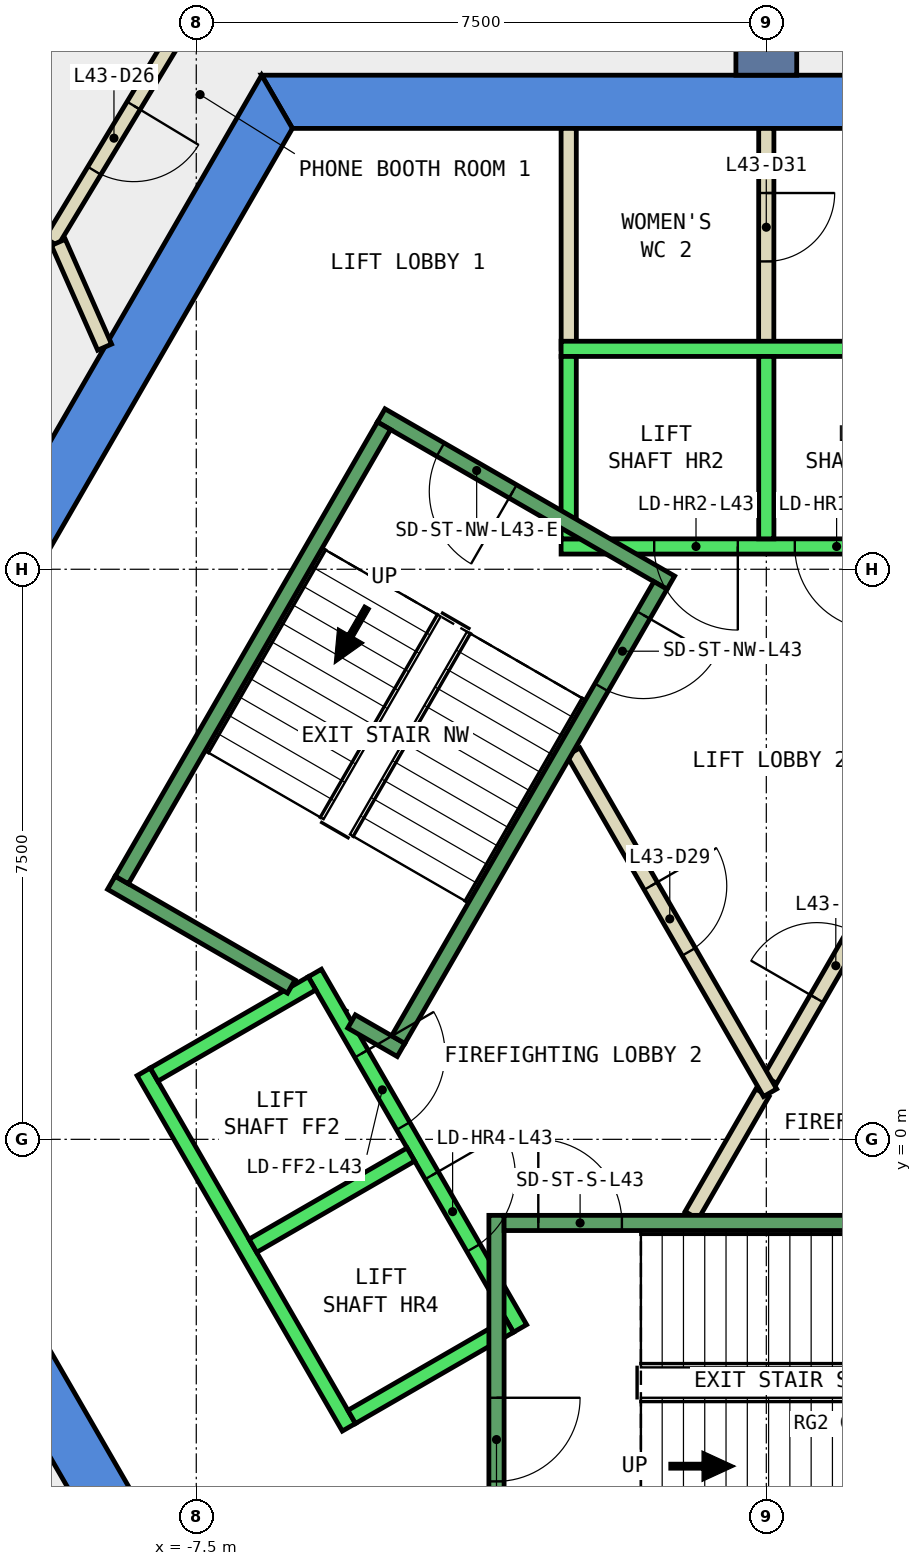
"""IFC4 building model, lengths in metres.
Left out: names, types, materials, properties, quantities, classifications, styles, units other than length and angle.
Written with IfcOpenShell. Run it as: python <this file> out.ifc"""

import sys

from ifc_helpers import new_model, si_unit, direction, frame, frame_2d, origin, place, context, subcontext, project, spatial, polyline, rectangle, outline, extrude, element, fill, save


model = new_model("IFC4")
c1 = context("Model", 3, precision=1e-05, world=origin(), true_north=direction((0.0, 1.0)))
c2 = subcontext(c1, "Body", "Model", "MODEL_VIEW")
j1 = project(units=[si_unit("LENGTHUNIT", "METRE"), si_unit("PLANEANGLEUNIT", "RADIAN")], contexts=[c1])
p1 = place(None, origin())
s1 = spatial("IfcSite", under=j1, at=p1, CompositionType="ELEMENT")
p2 = place(p1, origin())
s2 = spatial("IfcBuilding", under=s1, at=p2, CompositionType="ELEMENT")
p3 = place(p2, frame((0.0, 0.0, 194.0)))
s3 = spatial("IfcBuildingStorey", under=s2, at=p3, CompositionType="ELEMENT", Elevation=194.0)
p4 = place(p3, frame((0.0, 0.0, -0.4)))
e1 = element("IfcWall", 1, at=p4, inside=s3, PredefinedType="SHEAR", context=c2, shape_type="SweptSolid", body=[
    extrude(outline(polyline([(6.64, 14.0), (-6.64, 14.0), (-6.235, 13.3), (6.235, 13.3), (6.64, 14.0)])), origin(), (0.0, 0.0, 1.0), 4.2),
])
p5 = place(p3, frame((0.0, 0.0, -0.4)))
e2 = element("IfcWall", 2, at=p5, inside=s3, PredefinedType="SHEAR", context=c2, shape_type="SweptSolid", body=[
    extrude(outline(polyline([(-11.834, 5.002), (-11.228, 4.652), (-6.235, 13.3), (-6.64, 14.0), (-11.834, 5.002)])), origin(), (0.0, 0.0, 1.0), 4.2),
])
p6 = place(p3, frame((0.0, 0.0, -0.4)))
e3 = element("IfcWall", 3, at=p6, inside=s3, PredefinedType="SHEAR", context=c2, shape_type="SweptSolid", body=[
    extrude(outline(polyline([(-13.279, 2.5), (-6.64, -9.0), (-6.235, -8.3), (-12.471, 2.5), (-13.279, 2.5)])), origin(), (0.0, 0.0, 1.0), 4.2),
])
p7 = place(p3, frame((0.0, 14.0, -0.4), z_axis=(0.0, 0.0, 1.0), x_axis=(0.0, 1.0, 0.0)))
e4 = element("IfcWall", 4, at=p7, inside=s3, PredefinedType="SHEAR", context=c2, shape_type="SweptSolid", body=[
    extrude(rectangle(XDim=9.0, YDim=0.8, at=frame_2d((4.5, 0.0))), origin(), (0.0, 0.0, 1.0), 4.2),
])
p8 = place(p3, frame((-7.759, 14.536, 0.0), z_axis=(0.0, 0.0, 1.0), x_axis=(-0.516926279395, -0.856029918678, 0.0)))
e5 = element("IfcWall", 5, at=p8, inside=s3, PredefinedType="PARTITIONING", context=c2, shape_type="SweptSolid", body=[
    extrude(rectangle(XDim=3.188, YDim=0.2, at=frame_2d((1.594, 0.0))), origin(), (0.0, 0.0, 1.0), 3.8),
])
p9 = place(p8, frame((1.094, 0.0, 0.0)))
e6 = element("IfcOpeningElement", 6, at=p9, cuts=e5, PredefinedType="OPENING", context=c2, shape_type="SweptSolid", body=[
    extrude(rectangle(XDim=1.0, YDim=2.1, at=frame_2d((0.5, 1.05))), frame((0.0, 0.11, 0.0), z_axis=(0.0, -1.0, 0.0), x_axis=(1.0, 0.0, 0.0)), (0.0, 0.0, 1.0), 0.22),
])
p10 = place(p3, frame((-9.315, 11.801, 0.0), z_axis=(0.0, 0.0, 1.0), x_axis=(0.403943240321, -0.914784050254, 0.0)))
e7 = element("IfcWall", 7, at=p10, inside=s3, PredefinedType="PARTITIONING", context=c2, shape_type="SweptSolid", body=[
    extrude(rectangle(XDim=1.507, YDim=0.2, at=frame_2d((0.754, 0.0))), origin(), (0.0, 0.0, 1.0), 3.8),
])
p11 = place(p3, frame((-2.599, 10.399, 0.0), z_axis=(0.0, 0.0, 1.0), x_axis=(-0.000336615314, 0.999999943345, 0.0)))
e8 = element("IfcWall", 8, at=p11, inside=s3, PredefinedType="PARTITIONING", context=c2, shape_type="SweptSolid", body=[
    extrude(rectangle(XDim=2.901, YDim=0.2, at=frame_2d((1.451, 0.0))), origin(), (0.0, 0.0, 1.0), 3.8),
])
p12 = place(p3, frame((0.0, 13.3, 0.0), z_axis=(0.0, 0.0, 1.0), x_axis=(-0.000336728662, -0.999999943307, 0.0)))
e9 = element("IfcWall", 9, at=p12, inside=s3, PredefinedType="PARTITIONING", context=c2, shape_type="SweptSolid", body=[
    extrude(rectangle(XDim=2.9, YDim=0.2, at=frame_2d((1.45, 0.0))), origin(), (0.0, 0.0, 1.0), 3.8),
])
p13 = place(p12, frame((0.85, 0.0, 0.0)))
e10 = element("IfcOpeningElement", 10, at=p13, cuts=e9, PredefinedType="OPENING", context=c2, shape_type="SweptSolid", body=[
    extrude(rectangle(XDim=0.9, YDim=2.1, at=frame_2d((0.45, 1.05))), frame((0.0, 0.11, 0.0), z_axis=(0.0, -1.0, 0.0), x_axis=(1.0, 0.0, 0.0)), (0.0, 0.0, 1.0), 0.22),
])
p14 = place(p3, frame((-0.982, -1.0, 0.0), z_axis=(0.0, 0.0, 1.0), x_axis=(0.50024047865, 0.865886518847, 0.0)))
e11 = element("IfcWall", 11, at=p14, inside=s3, PredefinedType="PARTITIONING", context=c2, shape_type="SweptSolid", body=[
    extrude(rectangle(XDim=1.863, YDim=0.2, at=frame_2d((0.931, 0.0))), origin(), (0.0, 0.0, 1.0), 3.8),
])
p15 = place(p3, frame((0.05, 0.787, 0.0), z_axis=(0.0, 0.0, 1.0), x_axis=(0.499954076797, 0.866051915934, 0.0)))
e12 = element("IfcWall", 12, at=p15, inside=s3, PredefinedType="PARTITIONING", context=c2, shape_type="SweptSolid", body=[
    extrude(rectangle(XDim=3.558, YDim=0.2, at=frame_2d((1.779, 0.0))), origin(), (0.0, 0.0, 1.0), 3.8),
])
p16 = place(p15, frame((1.229, 0.0, 0.0)))
e13 = element("IfcOpeningElement", 13, at=p16, cuts=e12, PredefinedType="OPENING", context=c2, shape_type="SweptSolid", body=[
    extrude(rectangle(XDim=1.0, YDim=2.1, at=frame_2d((0.5, 1.05))), frame((0.0, 0.11, 0.0), z_axis=(0.0, -1.0, 0.0), x_axis=(1.0, 0.0, 0.0)), (0.0, 0.0, 1.0), 0.22),
])
p17 = place(p3, frame((-2.54, 5.1, 0.0), z_axis=(0.0, 0.0, 1.0), x_axis=(0.499925051871, -0.866068670783, 0.0)))
e14 = element("IfcWall", 14, at=p17, inside=s3, PredefinedType="PARTITIONING", context=c2, shape_type="SweptSolid", body=[
    extrude(rectangle(XDim=5.181, YDim=0.2, at=frame_2d((2.59, 0.0))), origin(), (0.0, 0.0, 1.0), 3.8),
])
p18 = place(p17, frame((2.04, 0.0, 0.0)))
e15 = element("IfcOpeningElement", 15, at=p18, cuts=e14, PredefinedType="OPENING", context=c2, shape_type="SweptSolid", body=[
    extrude(rectangle(XDim=1.0, YDim=2.1, at=frame_2d((0.5, 1.05))), frame((0.0, 0.11, 0.0), z_axis=(0.0, -1.0, 0.0), x_axis=(1.0, 0.0, 0.0)), (0.0, 0.0, 1.0), 0.22),
])
p19 = place(p3, frame((2.7, 7.8, 0.0), z_axis=(0.0, 0.0, 1.0), x_axis=(-1.0, 0.0, 0.0)))
e16 = element("IfcWall", 16, at=p19, inside=s3, PredefinedType="STANDARD", context=c2, shape_type="SweptSolid", body=[
    extrude(rectangle(XDim=5.4, YDim=0.2, at=frame_2d((2.7, 0.0))), origin(), (0.0, 0.0, 1.0), 3.8),
])
p20 = place(p19, frame((1.225, 0.0, 0.0)))
e17 = element("IfcOpeningElement", 17, at=p20, cuts=e16, PredefinedType="OPENING", context=c2, shape_type="SweptSolid", body=[
    extrude(rectangle(XDim=1.1, YDim=2.1, at=frame_2d((0.55, 1.05))), frame((0.0, 0.11, 0.0), z_axis=(0.0, -1.0, 0.0), x_axis=(1.0, 0.0, 0.0)), (0.0, 0.0, 1.0), 0.22),
])
p21 = place(p19, frame((3.075, 0.0, 0.0)))
e18 = element("IfcOpeningElement", 18, at=p21, cuts=e16, PredefinedType="OPENING", context=c2, shape_type="SweptSolid", body=[
    extrude(rectangle(XDim=1.1, YDim=2.1, at=frame_2d((0.55, 1.05))), frame((0.0, 0.11, 0.0), z_axis=(0.0, -1.0, 0.0), x_axis=(1.0, 0.0, 0.0)), (0.0, 0.0, 1.0), 0.22),
])
p22 = place(p3, frame((2.7, 10.4, 0.0), z_axis=(0.0, 0.0, 1.0), x_axis=(-1.0, 0.0, 0.0)))
e19 = element("IfcWall", 19, at=p22, inside=s3, PredefinedType="STANDARD", context=c2, shape_type="SweptSolid", body=[
    extrude(rectangle(XDim=5.4, YDim=0.2, at=frame_2d((2.7, 0.0))), origin(), (0.0, 0.0, 1.0), 3.8),
])
for number, where, z_axis, x_axis in (
    (20, (0.0, 7.9, 0.0), (0.0, 0.0, 1.0), (0.0, 1.0, 0.0)),
    (21, (-2.6, 7.9, 0.0), (0.0, 0.0, 1.0), (0.0, 1.0, 0.0)),
):
    element("IfcWall", number, at=place(p3, frame(where, z_axis=z_axis, x_axis=x_axis)), inside=s3, PredefinedType="STANDARD", context=c2, shape_type="SweptSolid", body=[
        extrude(rectangle(XDim=2.4, YDim=0.2, at=frame_2d((1.2, 0.0))), origin(), (0.0, 0.0, 1.0), 3.8),
    ])
p23 = place(p3, frame((-5.94, 2.188, 0.0), z_axis=(0.0, 0.0, 1.0), x_axis=(0.500034260056, -0.866005622828, 0.0)))
e22 = element("IfcWall", 22, at=p23, inside=s3, PredefinedType="STANDARD", context=c2, shape_type="SweptSolid", body=[
    extrude(rectangle(XDim=5.399, YDim=0.2, at=frame_2d((2.7, 0.0))), origin(), (0.0, 0.0, 1.0), 3.8),
])
p24 = place(p23, frame((3.075, 0.0, 0.0)))
e23 = element("IfcOpeningElement", 23, at=p24, cuts=e22, PredefinedType="OPENING", context=c2, shape_type="SweptSolid", body=[
    extrude(rectangle(XDim=1.1, YDim=2.1, at=frame_2d((0.55, 1.05))), frame((0.0, 0.11, 0.0), z_axis=(0.0, -1.0, 0.0), x_axis=(1.0, 0.0, 0.0)), (0.0, 0.0, 1.0), 0.22),
])
p25 = place(p23, frame((1.225, 0.0, 0.0)))
e24 = element("IfcOpeningElement", 24, at=p25, cuts=e22, PredefinedType="OPENING", context=c2, shape_type="SweptSolid", body=[
    extrude(rectangle(XDim=1.1, YDim=2.1, at=frame_2d((0.55, 1.05))), frame((0.0, 0.11, 0.0), z_axis=(0.0, -1.0, 0.0), x_axis=(1.0, 0.0, 0.0)), (0.0, 0.0, 1.0), 0.22),
])
p26 = place(p3, frame((-8.192, 0.888, 0.0), z_axis=(0.0, 0.0, 1.0), x_axis=(0.500034260056, -0.866005622828, 0.0)))
e25 = element("IfcWall", 25, at=p26, inside=s3, PredefinedType="STANDARD", context=c2, shape_type="SweptSolid", body=[
    extrude(rectangle(XDim=5.399, YDim=0.2, at=frame_2d((2.7, 0.0))), origin(), (0.0, 0.0, 1.0), 3.8),
])
for number, where, z_axis, x_axis in (
    (26, (-5.977, 2.052, 0.0), (0.0, 0.0, 1.0), (-0.866, -0.5, 0.0)),
    (27, (-4.677, -0.2, 0.0), (0.0, 0.0, 1.0), (-0.866, -0.5, 0.0)),
):
    element("IfcWall", number, at=place(p3, frame(where, z_axis=z_axis, x_axis=x_axis)), inside=s3, PredefinedType="STANDARD", context=c2, shape_type="SweptSolid", body=[
        extrude(rectangle(XDim=2.399, YDim=0.2, at=frame_2d((1.2, 0.0))), origin(), (0.0, 0.0, 1.0), 3.8),
    ])
p27 = place(p3, frame((-3.377, -2.452, 0.0), z_axis=(0.0, 0.0, 1.0), x_axis=(-0.865955154139, -0.50012165622, 0.0)))
e28 = element("IfcWall", 28, at=p27, inside=s3, PredefinedType="STANDARD", context=c2, shape_type="SweptSolid", body=[
    extrude(rectangle(XDim=2.4, YDim=0.2, at=frame_2d((1.2, 0.0))), origin(), (0.0, 0.0, 1.0), 3.8),
])
p28 = place(p3, frame((-3.55, -1.0, 0.0), z_axis=(0.0, 0.0, 1.0), x_axis=(0.0, -1.0, 0.0)))
e29 = element("IfcWall", 29, at=p28, inside=s3, PredefinedType="STANDARD", context=c2, shape_type="SweptSolid", body=[
    extrude(rectangle(XDim=4.4, YDim=0.2, at=frame_2d((2.2, 0.0))), origin(), (0.0, 0.0, 1.0), 3.8),
])
p29 = place(p28, frame((2.4, 0.0, 0.0)))
e30 = element("IfcOpeningElement", 30, at=p29, cuts=e29, PredefinedType="OPENING", context=c2, shape_type="SweptSolid", body=[
    extrude(rectangle(XDim=1.1, YDim=2.2, at=frame_2d((0.55, 1.1))), frame((0.0, 0.11, 0.0), z_axis=(0.0, -1.0, 0.0), x_axis=(1.0, 0.0, 0.0)), (0.0, 0.0, 1.0), 0.22),
])
p30 = place(p3, frame((-3.45, -1.1, 0.0), z_axis=(0.0, 0.0, 1.0), x_axis=(1.0, 0.0, 0.0)))
e31 = element("IfcWall", 31, at=p30, inside=s3, PredefinedType="STANDARD", context=c2, shape_type="SweptSolid", body=[
    extrude(rectangle(XDim=6.9, YDim=0.2, at=frame_2d((3.45, 0.0))), origin(), (0.0, 0.0, 1.0), 3.8),
])
p31 = place(p30, frame((0.45, 0.0, 0.0)))
e32 = element("IfcOpeningElement", 32, at=p31, cuts=e31, PredefinedType="OPENING", context=c2, shape_type="SweptSolid", body=[
    extrude(rectangle(XDim=1.1, YDim=2.2, at=frame_2d((0.55, 1.1))), frame((0.0, 0.11, 0.0), z_axis=(0.0, -1.0, 0.0), x_axis=(1.0, 0.0, 0.0)), (0.0, 0.0, 1.0), 0.22),
])
p32 = place(p3, frame((-1.256, 7.324, 0.0), z_axis=(0.0, 0.0, 1.0), x_axis=(-0.866046073146, 0.499964197906, 0.0)))
e33 = element("IfcWall", 33, at=p32, inside=s3, PredefinedType="STANDARD", context=c2, shape_type="SweptSolid", body=[
    extrude(rectangle(XDim=4.4, YDim=0.2, at=frame_2d((2.2, 0.0))), origin(), (0.0, 0.0, 1.0), 3.8),
])
p33 = place(p32, frame((2.4, 0.0, 0.0)))
e34 = element("IfcOpeningElement", 34, at=p33, cuts=e33, PredefinedType="OPENING", context=c2, shape_type="SweptSolid", body=[
    extrude(rectangle(XDim=1.1, YDim=2.2, at=frame_2d((0.55, 1.1))), frame((0.0, 0.11, 0.0), z_axis=(0.0, -1.0, 0.0), x_axis=(1.0, 0.0, 0.0)), (0.0, 0.0, 1.0), 0.22),
])
p34 = place(p3, frame((-6.25, 2.01, 0.0), z_axis=(0.0, 0.0, 1.0), x_axis=(-0.86611865017, 0.499838457731, 0.0)))
e35 = element("IfcWall", 35, at=p34, inside=s3, PredefinedType="STANDARD", context=c2, shape_type="SweptSolid", body=[
    extrude(rectangle(XDim=2.733, YDim=0.2, at=frame_2d((1.366, 0.0))), origin(), (0.0, 0.0, 1.0), 3.8),
])
p35 = place(p3, frame((-4.806, 1.176, 0.0), z_axis=(0.0, 0.0, 1.0), x_axis=(-0.866558586415, 0.499075361355, 0.0)))
e36 = element("IfcWall", 36, at=p35, inside=s3, PredefinedType="STANDARD", context=c2, shape_type="SweptSolid", body=[
    extrude(rectangle(XDim=0.751, YDim=0.2, at=frame_2d((0.376, 0.0))), origin(), (0.0, 0.0, 1.0), 3.8),
])
p36 = place(p3, frame((-1.393, 7.288, 0.0), z_axis=(0.0, 0.0, 1.0), x_axis=(-0.499963383562, -0.866046543262, 0.0)))
e37 = element("IfcWall", 37, at=p36, inside=s3, PredefinedType="STANDARD", context=c2, shape_type="SweptSolid", body=[
    extrude(rectangle(XDim=6.9, YDim=0.2, at=frame_2d((3.45, 0.0))), origin(), (0.0, 0.0, 1.0), 3.8),
])
p37 = place(p36, frame((0.45, 0.0, 0.0)))
e38 = element("IfcOpeningElement", 38, at=p37, cuts=e37, PredefinedType="OPENING", context=c2, shape_type="SweptSolid", body=[
    extrude(rectangle(XDim=1.1, YDim=2.2, at=frame_2d((0.55, 1.1))), frame((0.0, 0.11, 0.0), z_axis=(0.0, -1.0, 0.0), x_axis=(1.0, 0.0, 0.0)), (0.0, 0.0, 1.0), 0.22),
])
p38 = place(p3, frame((-5.03, 9.388, 0.0), z_axis=(0.0, 0.0, 1.0), x_axis=(-0.499978703459, -0.866037698999, 0.0)))
e39 = element("IfcWall", 39, at=p38, inside=s3, PredefinedType="STANDARD", context=c2, shape_type="SweptSolid", body=[
    extrude(rectangle(XDim=6.9, YDim=0.2, at=frame_2d((3.45, 0.0))), origin(), (0.0, 0.0, 1.0), 3.8),
])
p39 = place(p9, origin())
e40 = element("IfcDoor", 40, at=p39, inside=s3, OperationType="SINGLE_SWING_LEFT", PredefinedType="DOOR", context=c2, shape_type="SweptSolid", body=[
    extrude(rectangle(XDim=1.0, YDim=2.1, at=frame_2d((0.5, 1.05))), frame((0.0, 0.025, 0.0), z_axis=(0.0, -1.0, 0.0), x_axis=(1.0, 0.0, 0.0)), (0.0, 0.0, 1.0), 0.05),
])
fill(e6, e40)
p40 = place(p16, origin())
e41 = element("IfcDoor", 41, at=p40, inside=s3, OperationType="SINGLE_SWING_RIGHT", PredefinedType="DOOR", context=c2, shape_type="SweptSolid", body=[
    extrude(rectangle(XDim=1.0, YDim=2.1, at=frame_2d((0.5, 1.05))), frame((0.0, 0.025, 0.0), z_axis=(0.0, -1.0, 0.0), x_axis=(1.0, 0.0, 0.0)), (0.0, 0.0, 1.0), 0.05),
])
fill(e13, e41)
p41 = place(p18, origin())
e42 = element("IfcDoor", 42, at=p41, inside=s3, OperationType="SINGLE_SWING_RIGHT", PredefinedType="DOOR", context=c2, shape_type="SweptSolid", body=[
    extrude(rectangle(XDim=1.0, YDim=2.1, at=frame_2d((0.5, 1.05))), frame((0.0, 0.025, 0.0), z_axis=(0.0, -1.0, 0.0), x_axis=(1.0, 0.0, 0.0)), (0.0, 0.0, 1.0), 0.05),
])
fill(e15, e42)
p42 = place(p13, origin())
e43 = element("IfcDoor", 43, at=p42, inside=s3, OperationType="SINGLE_SWING_RIGHT", PredefinedType="DOOR", context=c2, shape_type="SweptSolid", body=[
    extrude(rectangle(XDim=0.9, YDim=2.1, at=frame_2d((0.45, 1.05))), frame((0.0, 0.025, 0.0), z_axis=(0.0, -1.0, 0.0), x_axis=(1.0, 0.0, 0.0)), (0.0, 0.0, 1.0), 0.05),
])
fill(e10, e43)
p43 = place(p20, origin())
e44 = element("IfcDoor", 44, at=p43, inside=s3, OperationType="SLIDING_TO_LEFT", PredefinedType="DOOR", context=c2, shape_type="SweptSolid", body=[
    extrude(rectangle(XDim=1.1, YDim=2.1, at=frame_2d((0.55, 1.05))), frame((0.0, 0.025, 0.0), z_axis=(0.0, -1.0, 0.0), x_axis=(1.0, 0.0, 0.0)), (0.0, 0.0, 1.0), 0.05),
])
fill(e17, e44)
p44 = place(p21, origin())
e45 = element("IfcDoor", 45, at=p44, inside=s3, OperationType="SLIDING_TO_LEFT", PredefinedType="DOOR", context=c2, shape_type="SweptSolid", body=[
    extrude(rectangle(XDim=1.1, YDim=2.1, at=frame_2d((0.55, 1.05))), frame((0.0, 0.025, 0.0), z_axis=(0.0, -1.0, 0.0), x_axis=(1.0, 0.0, 0.0)), (0.0, 0.0, 1.0), 0.05),
])
fill(e18, e45)
p45 = place(p24, origin())
e46 = element("IfcDoor", 46, at=p45, inside=s3, OperationType="SLIDING_TO_LEFT", PredefinedType="DOOR", context=c2, shape_type="SweptSolid", body=[
    extrude(rectangle(XDim=1.1, YDim=2.1, at=frame_2d((0.55, 1.05))), frame((0.0, 0.025, 0.0), z_axis=(0.0, -1.0, 0.0), x_axis=(1.0, 0.0, 0.0)), (0.0, 0.0, 1.0), 0.05),
])
fill(e23, e46)
p46 = place(p25, origin())
e47 = element("IfcDoor", 47, at=p46, inside=s3, OperationType="SLIDING_TO_LEFT", PredefinedType="DOOR", context=c2, shape_type="SweptSolid", body=[
    extrude(rectangle(XDim=1.1, YDim=2.1, at=frame_2d((0.55, 1.05))), frame((0.0, 0.025, 0.0), z_axis=(0.0, -1.0, 0.0), x_axis=(1.0, 0.0, 0.0)), (0.0, 0.0, 1.0), 0.05),
])
fill(e24, e47)
p47 = place(p31, origin())
e48 = element("IfcDoor", 48, at=p47, inside=s3, OperationType="SINGLE_SWING_LEFT", PredefinedType="DOOR", context=c2, shape_type="SweptSolid", body=[
    extrude(rectangle(XDim=1.1, YDim=2.2, at=frame_2d((0.55, 1.1))), frame((0.0, 0.025, 0.0), z_axis=(0.0, -1.0, 0.0), x_axis=(1.0, 0.0, 0.0)), (0.0, 0.0, 1.0), 0.05),
])
fill(e32, e48)
p48 = place(p29, origin())
e49 = element("IfcDoor", 49, at=p48, inside=s3, OperationType="SINGLE_SWING_LEFT", PredefinedType="DOOR", context=c2, shape_type="SweptSolid", body=[
    extrude(rectangle(XDim=1.1, YDim=2.2, at=frame_2d((0.55, 1.1))), frame((0.0, 0.025, 0.0), z_axis=(0.0, -1.0, 0.0), x_axis=(1.0, 0.0, 0.0)), (0.0, 0.0, 1.0), 0.05),
])
fill(e30, e49)
p49 = place(p37, origin())
e50 = element("IfcDoor", 50, at=p49, inside=s3, OperationType="SINGLE_SWING_LEFT", PredefinedType="DOOR", context=c2, shape_type="SweptSolid", body=[
    extrude(rectangle(XDim=1.1, YDim=2.2, at=frame_2d((0.55, 1.1))), frame((0.0, 0.025, 0.0), z_axis=(0.0, -1.0, 0.0), x_axis=(1.0, 0.0, 0.0)), (0.0, 0.0, 1.0), 0.05),
])
fill(e38, e50)
p50 = place(p33, origin())
e51 = element("IfcDoor", 51, at=p50, inside=s3, OperationType="SINGLE_SWING_LEFT", PredefinedType="DOOR", context=c2, shape_type="SweptSolid", body=[
    extrude(rectangle(XDim=1.1, YDim=2.2, at=frame_2d((0.55, 1.1))), frame((0.0, 0.025, 0.0), z_axis=(0.0, -1.0, 0.0), x_axis=(1.0, 0.0, 0.0)), (0.0, 0.0, 1.0), 0.05),
])
fill(e34, e51)
save(model, sys.argv[1])
